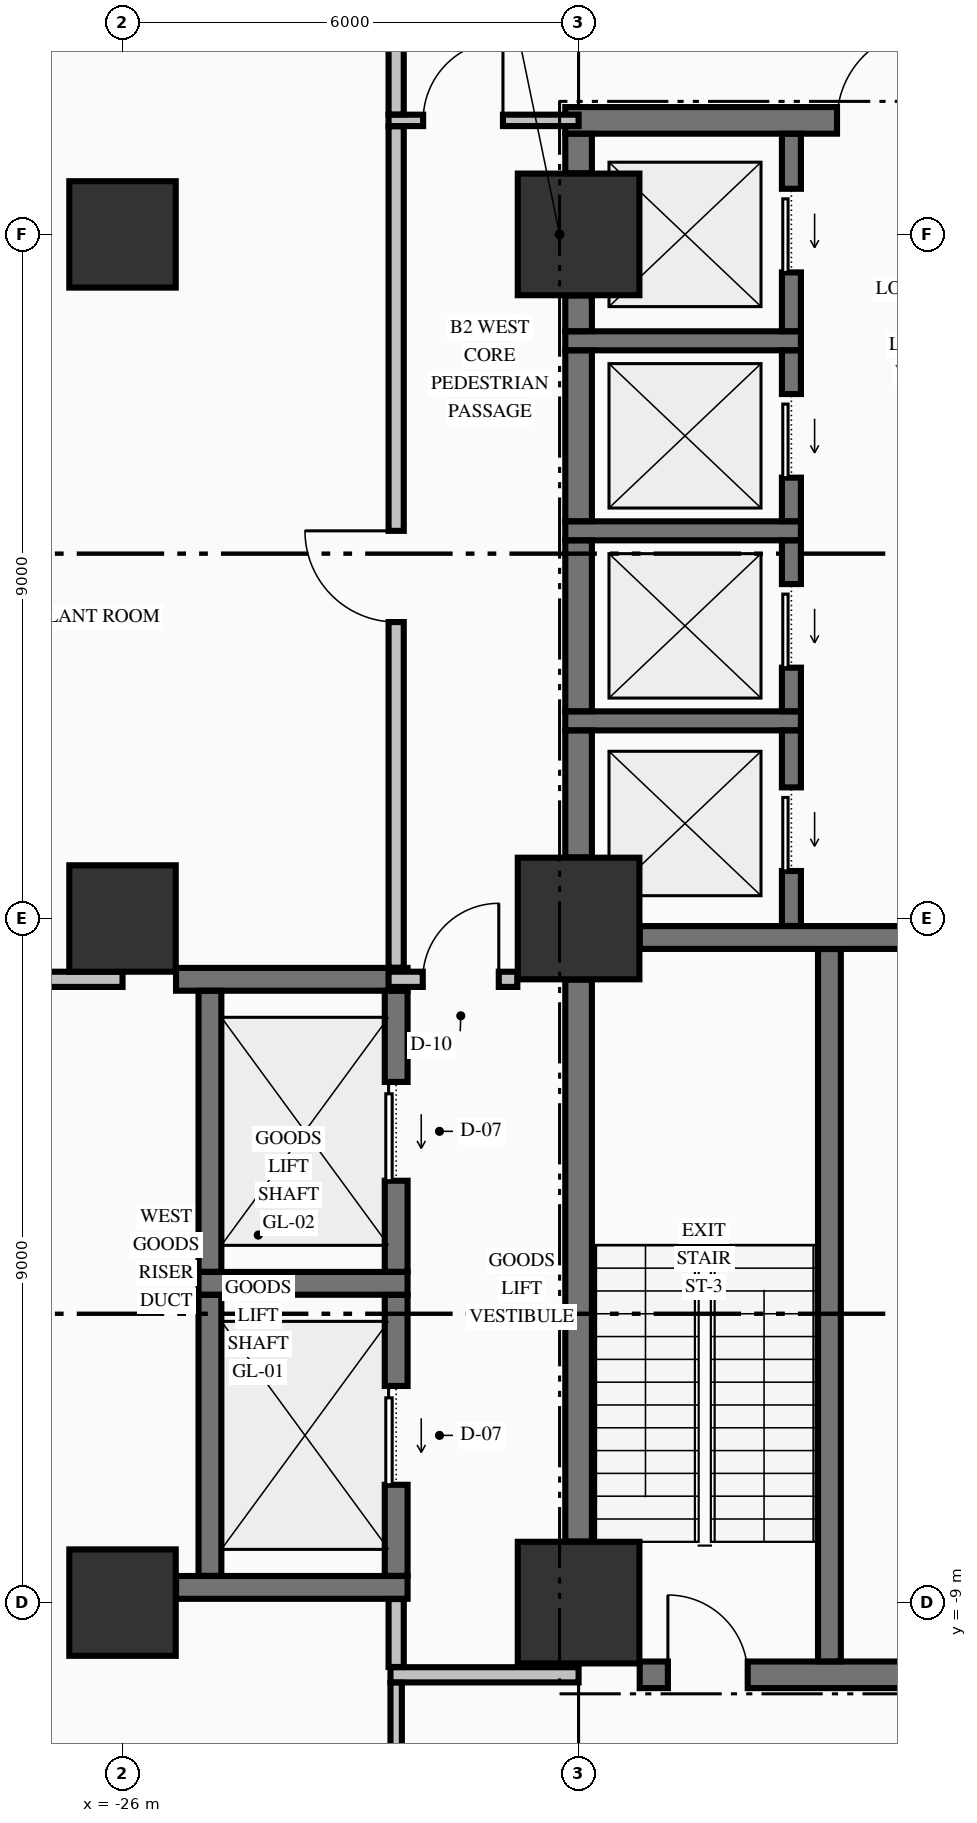
"""IFC4 building model, lengths in metres.
Left out: names, types, materials, properties, quantities, classifications, styles, units other than length and angle.
Written with IfcOpenShell. Run it as: python <this file> out.ifc"""

import sys

from ifc_helpers import new_model, si_unit, direction, frame, frame_2d, origin, origin_2d, place, context, subcontext, project, spatial, rectangle, extrude, element, fill, save


model = new_model("IFC4")
c1 = context("Model", 3, precision=1e-05, world=origin(), true_north=direction((0.0, 1.0)))
c2 = subcontext(c1, "Body", "Model", "MODEL_VIEW")
j1 = project(units=[si_unit("LENGTHUNIT", "METRE"), si_unit("PLANEANGLEUNIT", "RADIAN")], contexts=[c1])
p1 = place(None, origin())
s1 = spatial("IfcSite", under=j1, at=p1, CompositionType="ELEMENT")
p2 = place(p1, origin())
s2 = spatial("IfcBuilding", under=s1, at=p2, CompositionType="ELEMENT")
p3 = place(p2, frame((0.0, 0.0, -9.1)))
s3 = spatial("IfcBuildingStorey", under=s2, at=p3, CompositionType="ELEMENT", Elevation=-9.1)
for number, where, z_axis, x_axis in (
    (1, (-26.0, -9.0, -0.45), (0.0, 0.0, 1.0), (1.0, 0.0, 0.0)),
    (2, (-26.0, 0.0, -0.45), (0.0, 0.0, 1.0), (1.0, 0.0, 0.0)),
    (3, (-26.0, 9.0, -0.45), (0.0, 0.0, 1.0), (1.0, 0.0, 0.0)),
):
    element("IfcColumn", number, at=place(p3, frame(where, z_axis=z_axis, x_axis=x_axis)), inside=s3, PredefinedType="COLUMN", context=c2, shape_type="SweptSolid", body=[
        extrude(rectangle(XDim=1.4, YDim=1.4, at=origin_2d()), origin(), (0.0, 0.0, 1.0), 4.65),
    ])
for number, where, z_axis, x_axis in (
    (4, (-20.0, -9.0, -0.45), (0.0, 0.0, 1.0), (1.0, 0.0, 0.0)),
    (5, (-20.0, 0.0, -0.45), (0.0, 0.0, 1.0), (1.0, 0.0, 0.0)),
    (6, (-20.0, 9.0, -0.45), (0.0, 0.0, 1.0), (1.0, 0.0, 0.0)),
):
    element("IfcColumn", number, at=place(p3, frame(where, z_axis=z_axis, x_axis=x_axis)), inside=s3, PredefinedType="COLUMN", context=c2, shape_type="SweptSolid", body=[
        extrude(rectangle(XDim=1.6, YDim=1.6, at=origin_2d()), origin(), (0.0, 0.0, 1.0), 4.65),
    ])
p4 = place(p3, frame((-19.196, -9.95, 0.0), z_axis=(0.0, 0.0, 1.0), x_axis=(1.0, 0.0, 0.0)))
e7 = element("IfcWall", 7, at=p4, inside=s3, PredefinedType="SHEAR", context=c2, shape_type="SweptSolid", body=[
    extrude(rectangle(XDim=4.496, YDim=0.35, at=frame_2d((2.248, 0.0))), origin(), (0.0, 0.0, 1.0), 4.2),
])
p5 = place(p4, frame((0.371, 0.0, 0.0)))
e8 = element("IfcOpeningElement", 8, at=p5, cuts=e7, PredefinedType="OPENING", context=c2, shape_type="SweptSolid", body=[
    extrude(rectangle(XDim=1.05, YDim=2.15, at=frame_2d((0.525, 1.075))), frame((0.0, 0.185, 0.0), z_axis=(0.0, -1.0, 0.0), x_axis=(1.0, 0.0, 0.0)), (0.0, 0.0, 1.0), 0.37),
])
p6 = place(p3, frame((-25.296, -8.8, 0.0), z_axis=(0.0, 0.0, 1.0), x_axis=(1.0, 0.0, 0.0)))
e9 = element("IfcWall", 9, at=p6, inside=s3, PredefinedType="SHEAR", context=c2, shape_type="SweptSolid", body=[
    extrude(rectangle(XDim=3.046, YDim=0.3, at=frame_2d((1.523, 0.0))), origin(), (0.0, 0.0, 1.0), 4.2),
])
p7 = place(p3, frame((-25.0, -4.8, 0.0), z_axis=(0.0, 0.0, 1.0), x_axis=(1.0, 0.0, 0.0)))
e10 = element("IfcWall", 10, at=p7, inside=s3, PredefinedType="SHEAR", context=c2, shape_type="SweptSolid", body=[
    extrude(rectangle(XDim=2.75, YDim=0.3, at=frame_2d((1.375, 0.0))), origin(), (0.0, 0.0, 1.0), 4.2),
])
p8 = place(p3, frame((-25.296, -0.8, 0.0), z_axis=(0.0, 0.0, 1.0), x_axis=(1.0, 0.0, 0.0)))
e11 = element("IfcWall", 11, at=p8, inside=s3, PredefinedType="SHEAR", context=c2, shape_type="SweptSolid", body=[
    extrude(rectangle(XDim=3.046, YDim=0.3, at=frame_2d((1.523, 0.0))), origin(), (0.0, 0.0, 1.0), 4.2),
])
p9 = place(p3, frame((-19.196, -0.25, 0.0), z_axis=(0.0, 0.0, 1.0), x_axis=(1.0, 0.0, 0.0)))
e12 = element("IfcWall", 12, at=p9, inside=s3, PredefinedType="SHEAR", context=c2, shape_type="SweptSolid", body=[
    extrude(rectangle(XDim=7.392, YDim=0.3, at=frame_2d((3.696, 0.0))), origin(), (0.0, 0.0, 1.0), 4.2),
])
p10 = place(p9, frame((5.496, 0.0, 0.0)))
e13 = element("IfcOpeningElement", 13, at=p10, cuts=e12, PredefinedType="OPENING", context=c2, shape_type="SweptSolid", body=[
    extrude(rectangle(XDim=1.1, YDim=2.15, at=frame_2d((0.55, 1.075))), frame((0.0, 0.16, 0.0), z_axis=(0.0, -1.0, 0.0), x_axis=(1.0, 0.0, 0.0)), (0.0, 0.0, 1.0), 0.32),
])
for number, where, z_axis, x_axis in (
    (14, (-20.175, 2.6, 0.0), (0.0, 0.0, 1.0), (1.0, 0.0, 0.0)),
    (15, (-20.175, 5.1, 0.0), (0.0, 0.0, 1.0), (1.0, 0.0, 0.0)),
    (16, (-20.175, 7.6, 0.0), (0.0, 0.0, 1.0), (1.0, 0.0, 0.0)),
):
    element("IfcWall", number, at=place(p3, frame(where, z_axis=z_axis, x_axis=x_axis)), inside=s3, PredefinedType="SOLIDWALL", context=c2, shape_type="SweptSolid", body=[
        extrude(rectangle(XDim=3.1, YDim=0.25, at=frame_2d((1.55, 0.0))), origin(), (0.0, 0.0, 1.0), 4.2),
    ])
p11 = place(p3, frame((-20.175, 10.5, 0.0), z_axis=(0.0, 0.0, 1.0), x_axis=(1.0, 0.0, 0.0)))
e17 = element("IfcWall", 17, at=p11, inside=s3, PredefinedType="SHEAR", context=c2, shape_type="SweptSolid", body=[
    extrude(rectangle(XDim=5.475, YDim=0.35, at=frame_2d((2.738, 0.0))), origin(), (0.0, 0.0, 1.0), 4.2),
])
p12 = place(p11, frame((3.575, 0.0, 0.0)))
e18 = element("IfcOpeningElement", 18, at=p12, cuts=e17, PredefinedType="OPENING", context=c2, shape_type="SweptSolid", body=[
    extrude(rectangle(XDim=1.2, YDim=2.15, at=frame_2d((0.6, 1.075))), frame((0.0, 0.185, 0.0), z_axis=(0.0, -1.0, 0.0), x_axis=(1.0, 0.0, 0.0)), (0.0, 0.0, 1.0), 0.37),
])
p13 = place(p3, frame((-22.475, -9.95, 0.0), z_axis=(0.0, 0.0, 1.0), x_axis=(1.0, 0.0, 0.0)))
e19 = element("IfcWall", 19, at=p13, inside=s3, PredefinedType="PARTITIONING", context=c2, shape_type="SweptSolid", body=[
    extrude(rectangle(XDim=2.475, YDim=0.2, at=frame_2d((1.238, 0.0))), origin(), (0.0, 0.0, 1.0), 4.2),
])
p14 = place(p3, frame((-33.722, -0.8, 0.0), z_axis=(0.0, 0.0, 1.0), x_axis=(1.0, 0.0, 0.0)))
e20 = element("IfcWall", 20, at=p14, inside=s3, PredefinedType="PARTITIONING", context=c2, shape_type="SweptSolid", body=[
    extrude(rectangle(XDim=7.722, YDim=0.2, at=frame_2d((3.861, 0.0))), origin(), (0.0, 0.0, 1.0), 4.2),
])
p15 = place(p3, frame((-22.5, -0.8, 0.0), z_axis=(0.0, 0.0, 1.0), x_axis=(1.0, 0.0, 0.0)))
e21 = element("IfcWall", 21, at=p15, inside=s3, PredefinedType="PARTITIONING", context=c2, shape_type="SweptSolid", body=[
    extrude(rectangle(XDim=1.694, YDim=0.2, at=frame_2d((0.847, 0.0))), origin(), (0.0, 0.0, 1.0), 4.2),
])
p16 = place(p15, frame((0.45, 0.0, 0.0)))
e22 = element("IfcOpeningElement", 22, at=p16, cuts=e21, PredefinedType="OPENING", context=c2, shape_type="SweptSolid", body=[
    extrude(rectangle(XDim=1.0, YDim=2.15, at=frame_2d((0.5, 1.075))), frame((0.0, 0.11, 0.0), z_axis=(0.0, -1.0, 0.0), x_axis=(1.0, 0.0, 0.0)), (0.0, 0.0, 1.0), 0.22),
])
p17 = place(p3, frame((-22.5, 10.5, 0.0), z_axis=(0.0, 0.0, 1.0), x_axis=(1.0, 0.0, 0.0)))
e23 = element("IfcWall", 23, at=p17, inside=s3, PredefinedType="PARTITIONING", context=c2, shape_type="SweptSolid", body=[
    extrude(rectangle(XDim=2.5, YDim=0.15, at=frame_2d((1.25, 0.0))), origin(), (0.0, 0.0, 1.0), 4.2),
])
p18 = place(p17, frame((0.455, 0.0, 0.0)))
e24 = element("IfcOpeningElement", 24, at=p18, cuts=e23, PredefinedType="OPENING", context=c2, shape_type="SweptSolid", body=[
    extrude(rectangle(XDim=1.05, YDim=2.15, at=frame_2d((0.525, 1.075))), frame((0.0, 0.085, 0.0), z_axis=(0.0, -1.0, 0.0), x_axis=(1.0, 0.0, 0.0)), (0.0, 0.0, 1.0), 0.17),
])
for number, where, z_axis, x_axis in (
    (25, (-24.85, -8.648, 0.0), (0.0, 0.0, 1.0), (0.0, 1.0, 0.0)),
    (26, (-24.85, -4.648, 0.0), (0.0, 0.0, 1.0), (0.0, 1.0, 0.0)),
):
    element("IfcWall", number, at=place(p3, frame(where, z_axis=z_axis, x_axis=x_axis)), inside=s3, PredefinedType="SHEAR", context=c2, shape_type="SweptSolid", body=[
        extrude(rectangle(XDim=3.696, YDim=0.3, at=frame_2d((1.848, 0.0))), origin(), (0.0, 0.0, 1.0), 4.2),
    ])
p19 = place(p3, frame((-22.4, -8.648, 0.0), z_axis=(0.0, 0.0, 1.0), x_axis=(0.0, 1.0, 0.0)))
e27 = element("IfcWall", 27, at=p19, inside=s3, PredefinedType="SHEAR", context=c2, shape_type="SweptSolid", body=[
    extrude(rectangle(XDim=3.696, YDim=0.3, at=frame_2d((1.848, 0.0))), origin(), (0.0, 0.0, 1.0), 4.2),
])
p20 = place(p19, frame((1.198, 0.0, 0.0)))
e28 = element("IfcOpeningElement", 28, at=p20, cuts=e27, PredefinedType="OPENING", context=c2, shape_type="SweptSolid", body=[
    extrude(rectangle(XDim=1.3, YDim=2.3, at=frame_2d((0.65, 1.15))), frame((0.0, 0.16, 0.0), z_axis=(0.0, -1.0, 0.0), x_axis=(1.0, 0.0, 0.0)), (0.0, 0.0, 1.0), 0.32),
])
p21 = place(p3, frame((-22.4, -4.648, 0.0), z_axis=(0.0, 0.0, 1.0), x_axis=(0.0, 1.0, 0.0)))
e29 = element("IfcWall", 29, at=p21, inside=s3, PredefinedType="SHEAR", context=c2, shape_type="SweptSolid", body=[
    extrude(rectangle(XDim=3.696, YDim=0.3, at=frame_2d((1.848, 0.0))), origin(), (0.0, 0.0, 1.0), 4.2),
])
p22 = place(p21, frame((1.198, 0.0, 0.0)))
e30 = element("IfcOpeningElement", 30, at=p22, cuts=e29, PredefinedType="OPENING", context=c2, shape_type="SweptSolid", body=[
    extrude(rectangle(XDim=1.3, YDim=2.3, at=frame_2d((0.65, 1.15))), frame((0.0, 0.16, 0.0), z_axis=(0.0, -1.0, 0.0), x_axis=(1.0, 0.0, 0.0)), (0.0, 0.0, 1.0), 0.32),
])
p23 = place(p3, frame((-20.0, -8.196, 0.0), z_axis=(0.0, 0.0, 1.0), x_axis=(0.0, 1.0, 0.0)))
e31 = element("IfcWall", 31, at=p23, inside=s3, PredefinedType="SHEAR", context=c2, shape_type="SweptSolid", body=[
    extrude(rectangle(XDim=7.392, YDim=0.35, at=frame_2d((3.696, 0.0))), origin(), (0.0, 0.0, 1.0), 4.2),
])
p24 = place(p3, frame((-20.0, 0.804, 0.0), z_axis=(0.0, 0.0, 1.0), x_axis=(0.0, 1.0, 0.0)))
e32 = element("IfcWall", 32, at=p24, inside=s3, PredefinedType="SHEAR", context=c2, shape_type="SweptSolid", body=[
    extrude(rectangle(XDim=1.669, YDim=0.35, at=frame_2d((0.834, 0.0))), origin(), (0.0, 0.0, 1.0), 4.2),
])
for number, where, z_axis, x_axis in (
    (33, (-20.0, 2.727, 0.0), (0.0, 0.0, 1.0), (0.0, 1.0, 0.0)),
    (34, (-20.0, 5.227, 0.0), (0.0, 0.0, 1.0), (0.0, 1.0, 0.0)),
):
    element("IfcWall", number, at=place(p3, frame(where, z_axis=z_axis, x_axis=x_axis)), inside=s3, PredefinedType="SHEAR", context=c2, shape_type="SweptSolid", body=[
        extrude(rectangle(XDim=2.246, YDim=0.35, at=frame_2d((1.123, 0.0))), origin(), (0.0, 0.0, 1.0), 4.2),
    ])
p25 = place(p3, frame((-20.0, 7.727, 0.0), z_axis=(0.0, 0.0, 1.0), x_axis=(0.0, 1.0, 0.0)))
e35 = element("IfcWall", 35, at=p25, inside=s3, PredefinedType="SHEAR", context=c2, shape_type="SweptSolid", body=[
    extrude(rectangle(XDim=0.469, YDim=0.35, at=frame_2d((0.234, 0.0))), origin(), (0.0, 0.0, 1.0), 4.2),
])
p26 = place(p3, frame((-20.0, 9.804, 0.0), z_axis=(0.0, 0.0, 1.0), x_axis=(0.0, 1.0, 0.0)))
e36 = element("IfcWall", 36, at=p26, inside=s3, PredefinedType="SHEAR", context=c2, shape_type="SweptSolid", body=[
    extrude(rectangle(XDim=0.519, YDim=0.35, at=frame_2d((0.26, 0.0))), origin(), (0.0, 0.0, 1.0), 4.2),
])
p27 = place(p3, frame((-17.2, -0.098, 0.0), z_axis=(0.0, 0.0, 1.0), x_axis=(0.0, 1.0, 0.0)))
e37 = element("IfcWall", 37, at=p27, inside=s3, PredefinedType="SOLIDWALL", context=c2, shape_type="SweptSolid", body=[
    extrude(rectangle(XDim=2.571, YDim=0.25, at=frame_2d((1.285, 0.0))), origin(), (0.0, 0.0, 1.0), 4.2),
])
p28 = place(p27, frame((0.723, 0.0, 0.0)))
e38 = element("IfcOpeningElement", 38, at=p28, cuts=e37, PredefinedType="OPENING", context=c2, shape_type="SweptSolid", body=[
    extrude(rectangle(XDim=1.1, YDim=2.2, at=frame_2d((0.55, 1.1))), frame((0.0, 0.135, 0.0), z_axis=(0.0, -1.0, 0.0), x_axis=(1.0, 0.0, 0.0)), (0.0, 0.0, 1.0), 0.27),
])
p29 = place(p3, frame((-17.2, 2.727, 0.0), z_axis=(0.0, 0.0, 1.0), x_axis=(0.0, 1.0, 0.0)))
e39 = element("IfcWall", 39, at=p29, inside=s3, PredefinedType="SOLIDWALL", context=c2, shape_type="SweptSolid", body=[
    extrude(rectangle(XDim=2.246, YDim=0.25, at=frame_2d((1.123, 0.0))), origin(), (0.0, 0.0, 1.0), 4.2),
])
p30 = place(p29, frame((0.573, 0.0, 0.0)))
e40 = element("IfcOpeningElement", 40, at=p30, cuts=e39, PredefinedType="OPENING", context=c2, shape_type="SweptSolid", body=[
    extrude(rectangle(XDim=1.1, YDim=2.2, at=frame_2d((0.55, 1.1))), frame((0.0, 0.135, 0.0), z_axis=(0.0, -1.0, 0.0), x_axis=(1.0, 0.0, 0.0)), (0.0, 0.0, 1.0), 0.27),
])
p31 = place(p3, frame((-17.2, 5.227, 0.0), z_axis=(0.0, 0.0, 1.0), x_axis=(0.0, 1.0, 0.0)))
e41 = element("IfcWall", 41, at=p31, inside=s3, PredefinedType="SOLIDWALL", context=c2, shape_type="SweptSolid", body=[
    extrude(rectangle(XDim=2.246, YDim=0.25, at=frame_2d((1.123, 0.0))), origin(), (0.0, 0.0, 1.0), 4.2),
])
p32 = place(p31, frame((0.573, 0.0, 0.0)))
e42 = element("IfcOpeningElement", 42, at=p32, cuts=e41, PredefinedType="OPENING", context=c2, shape_type="SweptSolid", body=[
    extrude(rectangle(XDim=1.1, YDim=2.2, at=frame_2d((0.55, 1.1))), frame((0.0, 0.135, 0.0), z_axis=(0.0, -1.0, 0.0), x_axis=(1.0, 0.0, 0.0)), (0.0, 0.0, 1.0), 0.27),
])
p33 = place(p3, frame((-17.2, 7.727, 0.0), z_axis=(0.0, 0.0, 1.0), x_axis=(0.0, 1.0, 0.0)))
e43 = element("IfcWall", 43, at=p33, inside=s3, PredefinedType="SOLIDWALL", context=c2, shape_type="SweptSolid", body=[
    extrude(rectangle(XDim=2.596, YDim=0.25, at=frame_2d((1.298, 0.0))), origin(), (0.0, 0.0, 1.0), 4.2),
])
p34 = place(p33, frame((0.773, 0.0, 0.0)))
e44 = element("IfcOpeningElement", 44, at=p34, cuts=e43, PredefinedType="OPENING", context=c2, shape_type="SweptSolid", body=[
    extrude(rectangle(XDim=1.1, YDim=2.2, at=frame_2d((0.55, 1.1))), frame((0.0, 0.135, 0.0), z_axis=(0.0, -1.0, 0.0), x_axis=(1.0, 0.0, 0.0)), (0.0, 0.0, 1.0), 0.27),
])
p35 = place(p3, frame((-16.7, -9.773, 0.0), z_axis=(0.0, 0.0, 1.0), x_axis=(0.0, 1.0, 0.0)))
e45 = element("IfcWall", 45, at=p35, inside=s3, PredefinedType="SHEAR", context=c2, shape_type="SweptSolid", body=[
    extrude(rectangle(XDim=9.371, YDim=0.3, at=frame_2d((4.686, 0.0))), origin(), (0.0, 0.0, 1.0), 4.2),
])
p36 = place(p3, frame((-22.4, -12.522, 0.0), z_axis=(0.0, 0.0, 1.0), x_axis=(0.0, 1.0, 0.0)))
e46 = element("IfcWall", 46, at=p36, inside=s3, PredefinedType="PARTITIONING", context=c2, shape_type="SweptSolid", body=[
    extrude(rectangle(XDim=2.469, YDim=0.15, at=frame_2d((1.234, 0.0))), origin(), (0.0, 0.0, 1.0), 4.2),
])
p37 = place(p3, frame((-22.4, -9.847, 0.0), z_axis=(0.0, 0.0, 1.0), x_axis=(0.0, 1.0, 0.0)))
e47 = element("IfcWall", 47, at=p37, inside=s3, PredefinedType="PARTITIONING", context=c2, shape_type="SweptSolid", body=[
    extrude(rectangle(XDim=0.894, YDim=0.2, at=frame_2d((0.447, 0.0))), origin(), (0.0, 0.0, 1.0), 4.2),
])
p38 = place(p3, frame((-22.4, -0.647, 0.0), z_axis=(0.0, 0.0, 1.0), x_axis=(0.0, 1.0, 0.0)))
e48 = element("IfcWall", 48, at=p38, inside=s3, PredefinedType="PARTITIONING", context=c2, shape_type="SweptSolid", body=[
    extrude(rectangle(XDim=11.069, YDim=0.2, at=frame_2d((5.535, 0.0))), origin(), (0.0, 0.0, 1.0), 4.2),
])
p39 = place(p38, frame((4.547, 0.0, 0.0)))
e49 = element("IfcOpeningElement", 49, at=p39, cuts=e48, PredefinedType="OPENING", context=c2, shape_type="SweptSolid", body=[
    extrude(rectangle(XDim=1.2, YDim=2.15, at=frame_2d((0.6, 1.075))), frame((0.0, 0.11, 0.0), z_axis=(0.0, -1.0, 0.0), x_axis=(1.0, 0.0, 0.0)), (0.0, 0.0, 1.0), 0.22),
])
p40 = place(p3, frame((-22.4, 10.578, 0.0), z_axis=(0.0, 0.0, 1.0), x_axis=(0.0, 1.0, 0.0)))
e50 = element("IfcWall", 50, at=p40, inside=s3, PredefinedType="PARTITIONING", context=c2, shape_type="SweptSolid", body=[
    extrude(rectangle(XDim=2.544, YDim=0.2, at=frame_2d((1.272, 0.0))), origin(), (0.0, 0.0, 1.0), 4.2),
])
p41 = place(p5, origin())
e51 = element("IfcDoor", 51, at=p41, inside=s3, OperationType="SINGLE_SWING_LEFT", PredefinedType="DOOR", context=c2, shape_type="SweptSolid", body=[
    extrude(rectangle(XDim=1.05, YDim=2.15, at=frame_2d((0.525, 1.075))), frame((0.0, 0.025, 0.0), z_axis=(0.0, -1.0, 0.0), x_axis=(1.0, 0.0, 0.0)), (0.0, 0.0, 1.0), 0.05),
])
fill(e8, e51)
p42 = place(p12, origin())
e52 = element("IfcDoor", 52, at=p42, inside=s3, OperationType="SINGLE_SWING_RIGHT", PredefinedType="DOOR", context=c2, shape_type="SweptSolid", body=[
    extrude(rectangle(XDim=1.2, YDim=2.15, at=frame_2d((0.6, 1.075))), frame((0.0, 0.025, 0.0), z_axis=(0.0, -1.0, 0.0), x_axis=(1.0, 0.0, 0.0)), (0.0, 0.0, 1.0), 0.05),
])
fill(e18, e52)
p43 = place(p28, origin())
e53 = element("IfcDoor", 53, at=p43, inside=s3, OperationType="SLIDING_TO_LEFT", PredefinedType="DOOR", context=c2, shape_type="SweptSolid", body=[
    extrude(rectangle(XDim=1.1, YDim=2.2, at=frame_2d((0.55, 1.1))), frame((0.0, 0.025, 0.0), z_axis=(0.0, -1.0, 0.0), x_axis=(1.0, 0.0, 0.0)), (0.0, 0.0, 1.0), 0.05),
])
fill(e38, e53)
p44 = place(p30, origin())
e54 = element("IfcDoor", 54, at=p44, inside=s3, OperationType="SLIDING_TO_LEFT", PredefinedType="DOOR", context=c2, shape_type="SweptSolid", body=[
    extrude(rectangle(XDim=1.1, YDim=2.2, at=frame_2d((0.55, 1.1))), frame((0.0, 0.025, 0.0), z_axis=(0.0, -1.0, 0.0), x_axis=(1.0, 0.0, 0.0)), (0.0, 0.0, 1.0), 0.05),
])
fill(e40, e54)
p45 = place(p32, origin())
e55 = element("IfcDoor", 55, at=p45, inside=s3, OperationType="SLIDING_TO_LEFT", PredefinedType="DOOR", context=c2, shape_type="SweptSolid", body=[
    extrude(rectangle(XDim=1.1, YDim=2.2, at=frame_2d((0.55, 1.1))), frame((0.0, 0.025, 0.0), z_axis=(0.0, -1.0, 0.0), x_axis=(1.0, 0.0, 0.0)), (0.0, 0.0, 1.0), 0.05),
])
fill(e42, e55)
p46 = place(p34, origin())
e56 = element("IfcDoor", 56, at=p46, inside=s3, OperationType="SLIDING_TO_LEFT", PredefinedType="DOOR", context=c2, shape_type="SweptSolid", body=[
    extrude(rectangle(XDim=1.1, YDim=2.2, at=frame_2d((0.55, 1.1))), frame((0.0, 0.025, 0.0), z_axis=(0.0, -1.0, 0.0), x_axis=(1.0, 0.0, 0.0)), (0.0, 0.0, 1.0), 0.05),
])
fill(e44, e56)
p47 = place(p20, origin())
e57 = element("IfcDoor", 57, at=p47, inside=s3, OperationType="SLIDING_TO_LEFT", PredefinedType="DOOR", context=c2, shape_type="SweptSolid", body=[
    extrude(rectangle(XDim=1.3, YDim=2.3, at=frame_2d((0.65, 1.15))), frame((0.0, 0.025, 0.0), z_axis=(0.0, -1.0, 0.0), x_axis=(1.0, 0.0, 0.0)), (0.0, 0.0, 1.0), 0.05),
])
fill(e28, e57)
p48 = place(p22, origin())
e58 = element("IfcDoor", 58, at=p48, inside=s3, OperationType="SLIDING_TO_LEFT", PredefinedType="DOOR", context=c2, shape_type="SweptSolid", body=[
    extrude(rectangle(XDim=1.3, YDim=2.3, at=frame_2d((0.65, 1.15))), frame((0.0, 0.025, 0.0), z_axis=(0.0, -1.0, 0.0), x_axis=(1.0, 0.0, 0.0)), (0.0, 0.0, 1.0), 0.05),
])
fill(e30, e58)
p49 = place(p16, origin())
e59 = element("IfcDoor", 59, at=p49, inside=s3, OperationType="SINGLE_SWING_RIGHT", PredefinedType="DOOR", context=c2, shape_type="SweptSolid", body=[
    extrude(rectangle(XDim=1.0, YDim=2.15, at=frame_2d((0.5, 1.075))), frame((0.0, 0.025, 0.0), z_axis=(0.0, -1.0, 0.0), x_axis=(1.0, 0.0, 0.0)), (0.0, 0.0, 1.0), 0.05),
])
fill(e22, e59)
p50 = place(p18, origin())
e60 = element("IfcDoor", 60, at=p50, inside=s3, OperationType="SINGLE_SWING_RIGHT", PredefinedType="DOOR", context=c2, shape_type="SweptSolid", body=[
    extrude(rectangle(XDim=1.05, YDim=2.15, at=frame_2d((0.525, 1.075))), frame((0.0, 0.025, 0.0), z_axis=(0.0, -1.0, 0.0), x_axis=(1.0, 0.0, 0.0)), (0.0, 0.0, 1.0), 0.05),
])
fill(e24, e60)
p51 = place(p39, origin())
e61 = element("IfcDoor", 61, at=p51, inside=s3, OperationType="SINGLE_SWING_RIGHT", PredefinedType="DOOR", context=c2, shape_type="SweptSolid", body=[
    extrude(rectangle(XDim=1.2, YDim=2.15, at=frame_2d((0.6, 1.075))), frame((0.0, 0.025, 0.0), z_axis=(0.0, -1.0, 0.0), x_axis=(1.0, 0.0, 0.0)), (0.0, 0.0, 1.0), 0.05),
])
fill(e49, e61)
save(model, sys.argv[1])
